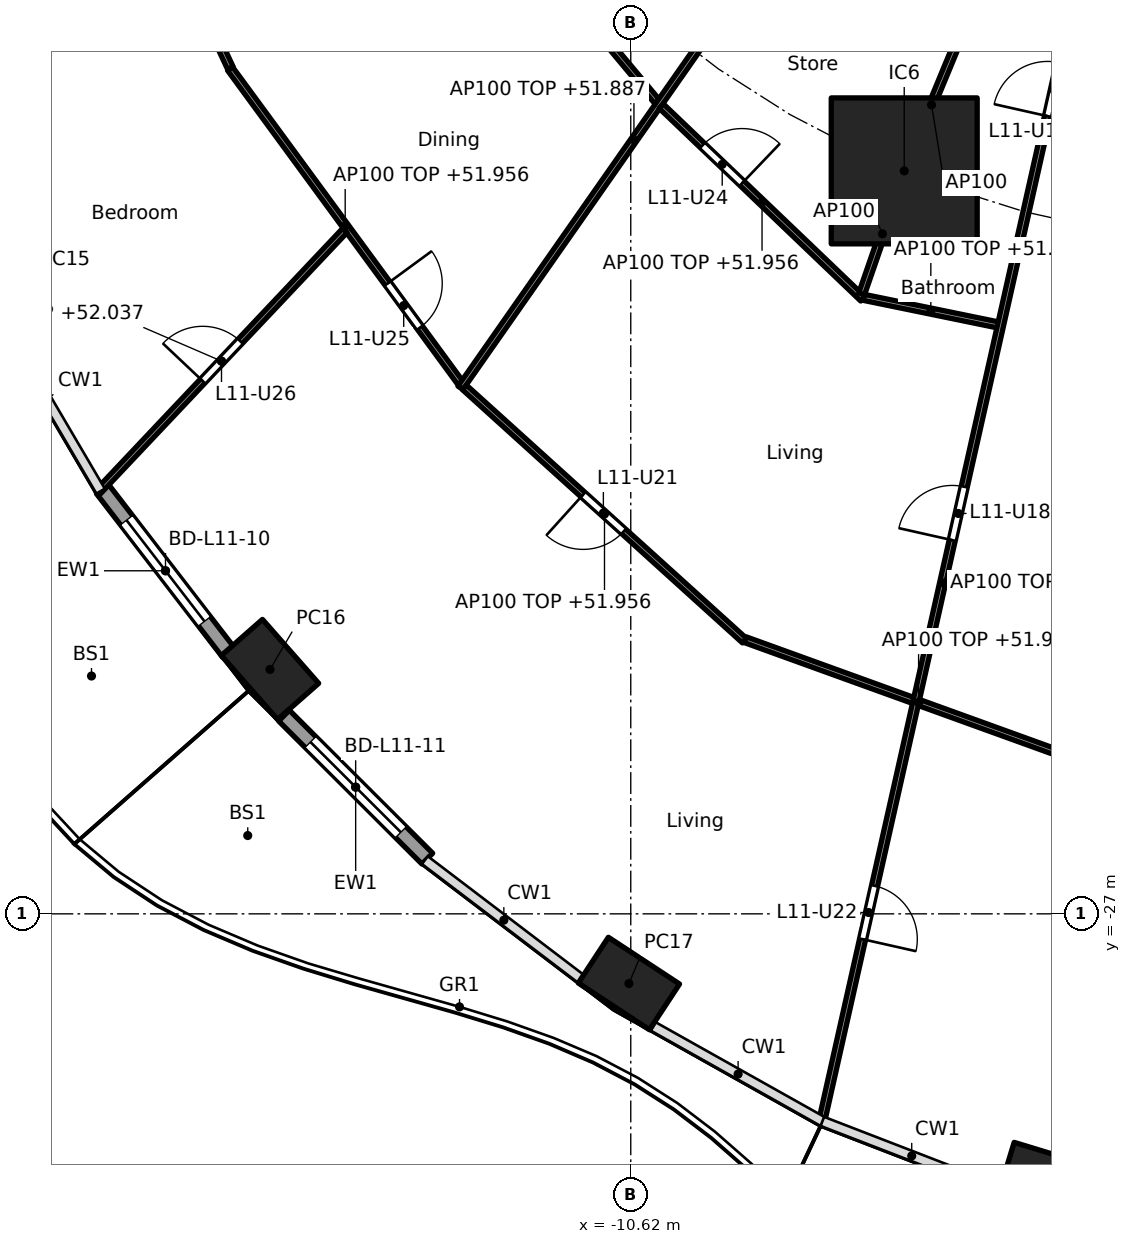
"""IFC4 building model, lengths in metres.
Left out: names, types, materials, properties, quantities, classifications, styles, units other than length and angle.
Written with IfcOpenShell. Run it as: python <this file> out.ifc"""

import sys

from ifc_helpers import new_model, si_unit, direction, frame, frame_2d, origin, origin_2d, place, context, subcontext, project, spatial, rectangle, hollow_rectangle, extrude, element, fill, save


model = new_model("IFC4")
c1 = context("Model", 3, precision=1e-05, world=origin(), true_north=direction((0.0, 1.0)))
c2 = subcontext(c1, "Body", "Model", "MODEL_VIEW")
j1 = project(units=[si_unit("LENGTHUNIT", "METRE"), si_unit("PLANEANGLEUNIT", "RADIAN")], contexts=[c1])
p1 = place(None, origin())
s1 = spatial("IfcSite", under=j1, at=p1, CompositionType="ELEMENT")
p2 = place(p1, origin())
s2 = spatial("IfcBuilding", under=s1, at=p2, CompositionType="ELEMENT")
p3 = place(p2, frame((0.0, 0.0, 49.2)))
s3 = spatial("IfcBuildingStorey", under=s2, at=p3, CompositionType="ELEMENT", Elevation=49.2)
for number, where, z_axis, x_axis in (
    (1, (-16.552, -22.981, 0.0), (0.0, 0.0, 1.0), (0.66, -0.751, 0.0)),
    (2, (-10.65, -28.146, 0.0), (0.0, 0.0, 1.0), (0.836, -0.549, 0.0)),
    (3, (-3.776, -31.393, 0.0), (0.0, 0.0, 1.0), (0.957, -0.292, 0.0)),
):
    element("IfcColumn", number, at=place(p3, frame(where, z_axis=z_axis, x_axis=x_axis)), inside=s3, PredefinedType="COLUMN", context=c2, shape_type="SweptSolid", body=[
        extrude(hollow_rectangle(XDim=1.4, YDim=0.9, WallThickness=0.05, at=origin_2d()), origin(), (0.0, 0.0, 1.0), 3.7),
    ])
p4 = place(p3, frame((-6.123, -14.782, 0.0), z_axis=(0.0, 0.0, 1.0), x_axis=(1.0, 0.0, 0.0)))
e4 = element("IfcColumn", 4, at=p4, inside=s3, PredefinedType="COLUMN", context=c2, shape_type="SweptSolid", body=[
    extrude(rectangle(XDim=2.4, YDim=2.4, at=origin_2d()), origin(), (0.0, 0.0, 1.0), 3.7),
])
p5 = place(p3, frame((-17.234, -22.704, 0.0), z_axis=(0.0, 0.0, 1.0), x_axis=(-0.610457147657, 0.792049285635, 0.0)))
e5 = element("IfcWall", 5, at=p5, inside=s3, PredefinedType="SOLIDWALL", context=c2, shape_type="SweptSolid", body=[
    extrude(rectangle(XDim=3.397, YDim=0.25, at=frame_2d((1.699, 0.0))), origin(), (0.0, 0.0, 1.0), 3.44),
])
p6 = place(p5, frame((0.649, 0.0, 0.0)))
e6 = element("IfcOpeningElement", 6, at=p6, cuts=e5, PredefinedType="OPENING", context=c2, shape_type="SweptSolid", body=[
    extrude(rectangle(XDim=2.1, YDim=2.4, at=frame_2d((1.05, 1.2))), frame((0.0, 0.135, 0.0), z_axis=(0.0, -1.0, 0.0), x_axis=(1.0, 0.0, 0.0)), (0.0, 0.0, 1.0), 0.27),
])
p7 = place(p3, frame((-13.966, -26.092, 0.0), z_axis=(0.0, 0.0, 1.0), x_axis=(-0.707803094595, 0.706409781417, 0.0)))
e7 = element("IfcWall", 7, at=p7, inside=s3, PredefinedType="SOLIDWALL", context=c2, shape_type="SweptSolid", body=[
    extrude(rectangle(XDim=3.329, YDim=0.25, at=frame_2d((1.665, 0.0))), origin(), (0.0, 0.0, 1.0), 3.44),
])
p8 = place(p7, frame((0.615, 0.0, 0.0)))
e8 = element("IfcOpeningElement", 8, at=p8, cuts=e7, PredefinedType="OPENING", context=c2, shape_type="SweptSolid", body=[
    extrude(rectangle(XDim=2.1, YDim=2.4, at=frame_2d((1.05, 1.2))), frame((0.0, 0.135, 0.0), z_axis=(0.0, -1.0, 0.0), x_axis=(1.0, 0.0, 0.0)), (0.0, 0.0, 1.0), 0.27),
])
p9 = place(p3, frame((-19.826, -7.491, 0.0), z_axis=(0.0, 0.0, 1.0), x_axis=(0.423926333401, -0.905696673202, 0.0)))
e9 = element("IfcWall", 9, at=p9, inside=s3, PredefinedType="PARTITIONING", context=c2, shape_type="SweptSolid", body=[
    extrude(rectangle(XDim=6.188, YDim=0.1, at=frame_2d((3.094, 0.0))), origin(), (0.0, 0.0, 1.0), 2.756),
])
p10 = place(p3, frame((-13.222, -10.007, 0.0), z_axis=(0.0, 0.0, 1.0), x_axis=(0.640807748916, -0.767701393075, 0.0)))
e10 = element("IfcWall", 10, at=p10, inside=s3, PredefinedType="PARTITIONING", context=c2, shape_type="SweptSolid", body=[
    extrude(rectangle(XDim=4.737, YDim=0.1, at=frame_2d((2.368, 0.0))), origin(), (0.0, 0.0, 1.0), 2.756),
])
p11 = place(p10, frame((1.943, 0.0, 0.0)))
e11 = element("IfcOpeningElement", 11, at=p11, cuts=e10, PredefinedType="OPENING", context=c2, shape_type="SweptSolid", body=[
    extrude(rectangle(XDim=0.9, YDim=2.1, at=frame_2d((0.45, 1.05))), frame((0.0, 0.06, 0.0), z_axis=(0.0, -1.0, 0.0), x_axis=(1.0, 0.0, 0.0)), (0.0, 0.0, 1.0), 0.12),
])
p12 = place(p3, frame((-17.211, -13.1, 0.0), z_axis=(0.0, 0.0, 1.0), x_axis=(0.591206785834, -0.806520016109, 0.0)))
e12 = element("IfcWall", 12, at=p12, inside=s3, PredefinedType="PARTITIONING", context=c2, shape_type="SweptSolid", body=[
    extrude(rectangle(XDim=6.41, YDim=0.1, at=frame_2d((3.205, 0.0))), origin(), (0.0, 0.0, 1.0), 2.756),
])
p13 = place(p12, frame((4.383, 0.0, 0.0)))
e13 = element("IfcOpeningElement", 13, at=p13, cuts=e12, PredefinedType="OPENING", context=c2, shape_type="SweptSolid", body=[
    extrude(rectangle(XDim=0.9, YDim=2.1, at=frame_2d((0.45, 1.05))), frame((0.0, 0.06, 0.0), z_axis=(0.0, -1.0, 0.0), x_axis=(1.0, 0.0, 0.0)), (0.0, 0.0, 1.0), 0.12),
])
p14 = place(p3, frame((-15.321, -15.761, 0.0), z_axis=(0.0, 0.0, 1.0), x_axis=(-0.686519245775, -0.727111631856, 0.0)))
e14 = element("IfcWall", 14, at=p14, inside=s3, PredefinedType="PARTITIONING", context=c2, shape_type="SweptSolid", body=[
    extrude(rectangle(XDim=5.912, YDim=0.1, at=frame_2d((2.956, 0.0))), origin(), (0.0, 0.0, 1.0), 2.837),
])
p15 = place(p14, frame((2.506, 0.0, 0.0)))
e15 = element("IfcOpeningElement", 15, at=p15, cuts=e14, PredefinedType="OPENING", context=c2, shape_type="SweptSolid", body=[
    extrude(rectangle(XDim=0.9, YDim=2.1, at=frame_2d((0.45, 1.05))), frame((0.0, 0.06, 0.0), z_axis=(0.0, -1.0, 0.0), x_axis=(1.0, 0.0, 0.0)), (0.0, 0.0, 1.0), 0.12),
])
p16 = place(p3, frame((-7.715, -10.193, 0.0), z_axis=(0.0, 0.0, 1.0), x_axis=(-0.573126502256, -0.819466907454, 0.0)))
e16 = element("IfcWall", 16, at=p16, inside=s3, PredefinedType="PARTITIONING", context=c2, shape_type="SweptSolid", body=[
    extrude(rectangle(XDim=9.954, YDim=0.1, at=frame_2d((4.977, 0.0))), origin(), (0.0, 0.0, 1.0), 2.687),
])
p17 = place(p3, frame((-10.119, -13.716, 0.0), z_axis=(0.0, 0.0, 1.0), x_axis=(0.722763212502, -0.69109575216, 0.0)))
e17 = element("IfcWall", 17, at=p17, inside=s3, PredefinedType="PARTITIONING", context=c2, shape_type="SweptSolid", body=[
    extrude(rectangle(XDim=4.587, YDim=0.1, at=frame_2d((2.293, 0.0))), origin(), (0.0, 0.0, 1.0), 2.756),
])
p18 = place(p17, frame((0.938, 0.0, 0.0)))
e18 = element("IfcOpeningElement", 18, at=p18, cuts=e17, PredefinedType="OPENING", context=c2, shape_type="SweptSolid", body=[
    extrude(rectangle(XDim=0.9, YDim=2.1, at=frame_2d((0.45, 1.05))), frame((0.0, 0.06, 0.0), z_axis=(0.0, -1.0, 0.0), x_axis=(1.0, 0.0, 0.0)), (0.0, 0.0, 1.0), 0.12),
])
p19 = place(p3, frame((-13.355, -18.343, 0.0), z_axis=(0.0, 0.0, 1.0), x_axis=(0.741720189244, -0.670709445936, 0.0)))
e19 = element("IfcWall", 19, at=p19, inside=s3, PredefinedType="PARTITIONING", context=c2, shape_type="SweptSolid", body=[
    extrude(rectangle(XDim=6.209, YDim=0.1, at=frame_2d((3.104, 0.0))), origin(), (0.0, 0.0, 1.0), 2.756),
])
p20 = place(p19, frame((2.63, 0.0, 0.0)))
e20 = element("IfcOpeningElement", 20, at=p20, cuts=e19, PredefinedType="OPENING", context=c2, shape_type="SweptSolid", body=[
    extrude(rectangle(XDim=0.9, YDim=2.1, at=frame_2d((0.45, 1.05))), frame((0.0, 0.06, 0.0), z_axis=(0.0, -1.0, 0.0), x_axis=(1.0, 0.0, 0.0)), (0.0, 0.0, 1.0), 0.12),
])
p21 = place(p3, frame((-5.243, -12.657, 0.0), z_axis=(0.0, 0.0, 1.0), x_axis=(-0.382719158442, -0.923864733477, 0.0)))
e21 = element("IfcWall", 21, at=p21, inside=s3, PredefinedType="PARTITIONING", context=c2, shape_type="SweptSolid", body=[
    extrude(rectangle(XDim=2.25, YDim=0.1, at=frame_2d((1.125, 0.0))), origin(), (0.0, 0.0, 1.0), 3.44),
])
p22 = place(p3, frame((-6.139, -14.83, 0.0), z_axis=(0.0, 0.0, 1.0), x_axis=(-0.327246993321, -0.944938836837, 0.0)))
e22 = element("IfcWall", 22, at=p22, inside=s3, PredefinedType="PARTITIONING", context=c2, shape_type="SweptSolid", body=[
    extrude(rectangle(XDim=2.09, YDim=0.1, at=frame_2d((1.045, 0.0))), origin(), (0.0, 0.0, 1.0), 3.44),
])
p23 = place(p3, frame((-6.791, -16.862, 0.0), z_axis=(0.0, 0.0, 1.0), x_axis=(0.979581941859, -0.201045316246, 0.0)))
e23 = element("IfcWall", 23, at=p23, inside=s3, PredefinedType="PARTITIONING", context=c2, shape_type="SweptSolid", body=[
    extrude(rectangle(XDim=2.256, YDim=0.1, at=frame_2d((1.128, 0.0))), origin(), (0.0, 0.0, 1.0), 2.756),
])
p24 = place(p3, frame((-8.739, -22.491, 0.0), z_axis=(0.0, 0.0, 1.0), x_axis=(0.940401691072, -0.340065669288, 0.0)))
e24 = element("IfcWall", 24, at=p24, inside=s3, PredefinedType="PARTITIONING", context=c2, shape_type="SweptSolid", body=[
    extrude(rectangle(XDim=6.067, YDim=0.1, at=frame_2d((3.034, 0.0))), origin(), (0.0, 0.0, 1.0), 2.756),
])
p25 = place(p3, frame((-3.492, -12.662, 0.0), z_axis=(0.0, 0.0, 1.0), x_axis=(-0.219268088006, -0.975664648115, 0.0)))
e25 = element("IfcWall", 25, at=p25, inside=s3, PredefinedType="PARTITIONING", context=c2, shape_type="SweptSolid", body=[
    extrude(rectangle(XDim=18.23, YDim=0.1, at=frame_2d((9.115, 0.0))), origin(), (0.0, 0.0, 1.0), 2.687),
])
p26 = place(p25, frame((0.35, 0.0, 0.0)))
e26 = element("IfcOpeningElement", 26, at=p26, cuts=e25, PredefinedType="OPENING", context=c2, shape_type="SweptSolid", body=[
    extrude(rectangle(XDim=0.9, YDim=2.1, at=frame_2d((0.45, 1.05))), frame((0.0, 0.06, 0.0), z_axis=(0.0, -1.0, 0.0), x_axis=(1.0, 0.0, 0.0)), (0.0, 0.0, 1.0), 0.12),
])
p27 = place(p25, frame((7.497, 0.0, 0.0)))
e27 = element("IfcOpeningElement", 27, at=p27, cuts=e25, PredefinedType="OPENING", context=c2, shape_type="SweptSolid", body=[
    extrude(rectangle(XDim=0.9, YDim=2.1, at=frame_2d((0.45, 1.05))), frame((0.0, 0.06, 0.0), z_axis=(0.0, -1.0, 0.0), x_axis=(1.0, 0.0, 0.0)), (0.0, 0.0, 1.0), 0.12),
])
p28 = place(p25, frame((14.223, 0.0, 0.0)))
e28 = element("IfcOpeningElement", 28, at=p28, cuts=e25, PredefinedType="OPENING", context=c2, shape_type="SweptSolid", body=[
    extrude(rectangle(XDim=0.9, YDim=2.1, at=frame_2d((0.45, 1.05))), frame((0.0, 0.06, 0.0), z_axis=(0.0, -1.0, 0.0), x_axis=(1.0, 0.0, 0.0)), (0.0, 0.0, 1.0), 0.12),
])
p29 = place(p6, origin())
e29 = element("IfcDoor", 29, at=p29, inside=s3, OperationType="SLIDING_TO_LEFT", PredefinedType="DOOR", context=c2, shape_type="SweptSolid", body=[
    extrude(rectangle(XDim=2.1, YDim=2.4, at=frame_2d((1.05, 1.2))), frame((0.0, 0.025, 0.0), z_axis=(0.0, -1.0, 0.0), x_axis=(1.0, 0.0, 0.0)), (0.0, 0.0, 1.0), 0.05),
])
fill(e6, e29)
p30 = place(p8, origin())
e30 = element("IfcDoor", 30, at=p30, inside=s3, OperationType="SLIDING_TO_LEFT", PredefinedType="DOOR", context=c2, shape_type="SweptSolid", body=[
    extrude(rectangle(XDim=2.1, YDim=2.4, at=frame_2d((1.05, 1.2))), frame((0.0, 0.025, 0.0), z_axis=(0.0, -1.0, 0.0), x_axis=(1.0, 0.0, 0.0)), (0.0, 0.0, 1.0), 0.05),
])
fill(e8, e30)
p31 = place(p26, frame((0.9, 0.0, 0.0), x_axis=(-1.0, 0.0, 0.0)))
e31 = element("IfcDoor", 31, at=p31, inside=s3, OperationType="SINGLE_SWING_LEFT", PredefinedType="DOOR", context=c2, shape_type="SweptSolid", body=[
    extrude(rectangle(XDim=0.9, YDim=2.1, at=frame_2d((0.45, 1.05))), frame((0.0, 0.025, 0.0), z_axis=(0.0, -1.0, 0.0), x_axis=(1.0, 0.0, 0.0)), (0.0, 0.0, 1.0), 0.05),
])
fill(e26, e31)
p32 = place(p27, frame((0.9, 0.0, 0.0), x_axis=(-1.0, 0.0, 0.0)))
e32 = element("IfcDoor", 32, at=p32, inside=s3, OperationType="SINGLE_SWING_LEFT", PredefinedType="DOOR", context=c2, shape_type="SweptSolid", body=[
    extrude(rectangle(XDim=0.9, YDim=2.1, at=frame_2d((0.45, 1.05))), frame((0.0, 0.025, 0.0), z_axis=(0.0, -1.0, 0.0), x_axis=(1.0, 0.0, 0.0)), (0.0, 0.0, 1.0), 0.05),
])
fill(e27, e32)
p33 = place(p20, frame((0.9, 0.0, 0.0), x_axis=(-1.0, 0.0, 0.0)))
e33 = element("IfcDoor", 33, at=p33, inside=s3, OperationType="SINGLE_SWING_RIGHT", PredefinedType="DOOR", context=c2, shape_type="SweptSolid", body=[
    extrude(rectangle(XDim=0.9, YDim=2.1, at=frame_2d((0.45, 1.05))), frame((0.0, 0.025, 0.0), z_axis=(0.0, -1.0, 0.0), x_axis=(1.0, 0.0, 0.0)), (0.0, 0.0, 1.0), 0.05),
])
fill(e20, e33)
p34 = place(p28, origin())
e34 = element("IfcDoor", 34, at=p34, inside=s3, OperationType="SINGLE_SWING_RIGHT", PredefinedType="DOOR", context=c2, shape_type="SweptSolid", body=[
    extrude(rectangle(XDim=0.9, YDim=2.1, at=frame_2d((0.45, 1.05))), frame((0.0, 0.025, 0.0), z_axis=(0.0, -1.0, 0.0), x_axis=(1.0, 0.0, 0.0)), (0.0, 0.0, 1.0), 0.05),
])
fill(e28, e34)
p35 = place(p18, origin())
e35 = element("IfcDoor", 35, at=p35, inside=s3, OperationType="SINGLE_SWING_RIGHT", PredefinedType="DOOR", context=c2, shape_type="SweptSolid", body=[
    extrude(rectangle(XDim=0.9, YDim=2.1, at=frame_2d((0.45, 1.05))), frame((0.0, 0.025, 0.0), z_axis=(0.0, -1.0, 0.0), x_axis=(1.0, 0.0, 0.0)), (0.0, 0.0, 1.0), 0.05),
])
fill(e18, e35)
p36 = place(p13, origin())
e36 = element("IfcDoor", 36, at=p36, inside=s3, OperationType="SINGLE_SWING_LEFT", PredefinedType="DOOR", context=c2, shape_type="SweptSolid", body=[
    extrude(rectangle(XDim=0.9, YDim=2.1, at=frame_2d((0.45, 1.05))), frame((0.0, 0.025, 0.0), z_axis=(0.0, -1.0, 0.0), x_axis=(1.0, 0.0, 0.0)), (0.0, 0.0, 1.0), 0.05),
])
fill(e13, e36)
p37 = place(p15, frame((0.9, 0.0, 0.0), x_axis=(-1.0, 0.0, 0.0)))
e37 = element("IfcDoor", 37, at=p37, inside=s3, OperationType="SINGLE_SWING_LEFT", PredefinedType="DOOR", context=c2, shape_type="SweptSolid", body=[
    extrude(rectangle(XDim=0.9, YDim=2.1, at=frame_2d((0.45, 1.05))), frame((0.0, 0.025, 0.0), z_axis=(0.0, -1.0, 0.0), x_axis=(1.0, 0.0, 0.0)), (0.0, 0.0, 1.0), 0.05),
])
fill(e15, e37)
save(model, sys.argv[1])
